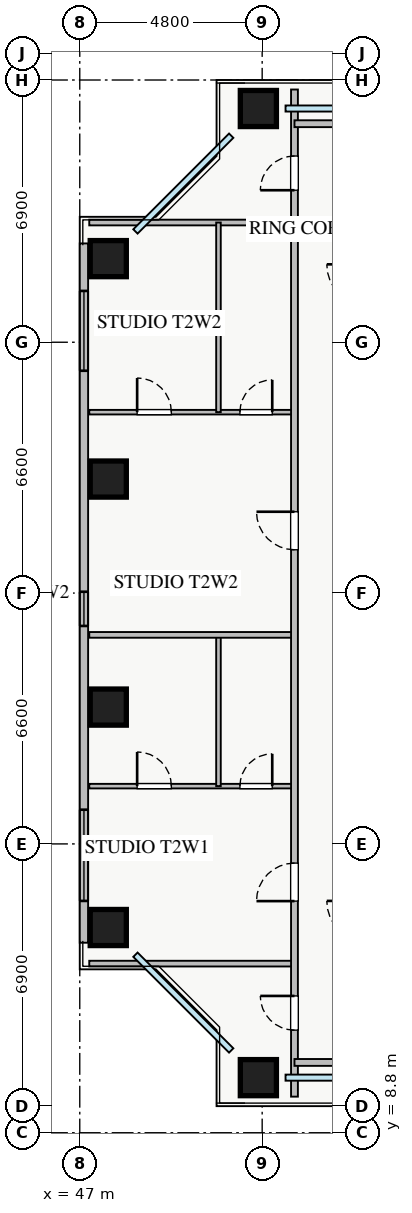
"""IFC4 building model, lengths in metres.
Left out: names, types, materials, properties, quantities, classifications, styles, units other than length and angle.
Written with IfcOpenShell. Run it as: python <this file> out.ifc"""

import sys

from ifc_helpers import new_model, si_unit, direction, frame, frame_2d, origin, origin_2d, place, context, subcontext, project, spatial, rectangle, extrude, source, transform, mapped, element, fill, save


model = new_model("IFC4")
c1 = context("Model", 3, precision=1e-05, world=origin(), true_north=direction((0.0, 1.0)))
c2 = subcontext(c1, "Body", "Model", "MODEL_VIEW")
j1 = project(units=[si_unit("LENGTHUNIT", "METRE"), si_unit("PLANEANGLEUNIT", "RADIAN")], contexts=[c1])
p1 = place(None, origin())
s1 = spatial("IfcSite", under=j1, at=p1, CompositionType="ELEMENT")
p2 = place(p1, origin())
s2 = spatial("IfcBuilding", under=s1, at=p2, CompositionType="ELEMENT")
p3 = place(p2, frame((0.0, 0.0, 53.5)))
s3 = spatial("IfcBuildingStorey", under=s2, at=p3, CompositionType="ELEMENT", Elevation=53.5)
m1 = source(origin(), c2, "Body", "SweptSolid", [
    extrude(rectangle(XDim=0.95, YDim=0.95, at=origin_2d()), origin(), (0.0, 0.0, 1.0), 3.25),
])
for number, where, z_axis, x_axis in (
    (1, (51.7, 10.25, 0.0), (0.0, 0.0, 1.0), (1.0, 0.0, 0.0)),
    (2, (51.7, 35.75, 0.0), (0.0, 0.0, 1.0), (1.0, 0.0, 0.0)),
    (3, (47.75, 14.2, 0.0), (0.0, 0.0, 1.0), (1.0, 0.0, 0.0)),
    (4, (47.75, 20.0, 0.0), (0.0, 0.0, 1.0), (1.0, 0.0, 0.0)),
    (5, (47.75, 26.0, 0.0), (0.0, 0.0, 1.0), (1.0, 0.0, 0.0)),
    (6, (47.75, 31.8, 0.0), (0.0, 0.0, 1.0), (1.0, 0.0, 0.0)),
):
    element("IfcColumn", number, at=place(p3, frame(where, z_axis=z_axis, x_axis=x_axis)), inside=s3, PredefinedType="COLUMN", context=c2, shape_type="MappedRepresentation", body=[
        mapped(m1, transform((0.0, 0.0, 0.0), x_axis=(1.0, 0.0, 0.0), y_axis=(0.0, 1.0, 0.0), z_axis=(0.0, 0.0, 1.0), scale=1.0)),
    ])
p4 = place(p3, frame((47.11, 13.8, 0.0), z_axis=(0.0, 0.0, 1.0), x_axis=(0.0, 1.0, 0.0)))
e7 = element("IfcWall", 7, at=p4, inside=s3, PredefinedType="STANDARD", context=c2, shape_type="SweptSolid", body=[
    extrude(rectangle(XDim=18.4, YDim=0.22, at=frame_2d((9.2, 0.0))), origin(), (0.0, 0.0, 1.0), 2.61),
])
p5 = place(p4, frame((1.1, 0.0, 0.9)))
e8 = element("IfcOpeningElement", 8, at=p5, cuts=e7, PredefinedType="OPENING", context=c2, shape_type="SweptSolid", body=[
    extrude(rectangle(XDim=2.4, YDim=1.48, at=frame_2d((1.2, 0.74))), frame((0.0, 0.12, 0.0), z_axis=(0.0, -1.0, 0.0), x_axis=(1.0, 0.0, 0.0)), (0.0, 0.0, 1.0), 0.24),
])
p6 = place(p4, frame((15.05, 0.0, 0.9)))
e9 = element("IfcOpeningElement", 9, at=p6, cuts=e7, PredefinedType="OPENING", context=c2, shape_type="SweptSolid", body=[
    extrude(rectangle(XDim=2.1, YDim=1.48, at=frame_2d((1.05, 0.74))), frame((0.0, 0.12, 0.0), z_axis=(0.0, -1.0, 0.0), x_axis=(1.0, 0.0, 0.0)), (0.0, 0.0, 1.0), 0.24),
])
p7 = place(p4, frame((8.335, 0.0, 0.9)))
e10 = element("IfcOpeningElement", 10, at=p7, cuts=e7, PredefinedType="OPENING", context=c2, shape_type="SweptSolid", body=[
    extrude(rectangle(XDim=0.9, YDim=1.2, at=frame_2d((0.45, 0.6))), frame((0.0, 0.12, 0.0), z_axis=(0.0, -1.0, 0.0), x_axis=(1.0, 0.0, 0.0)), (0.0, 0.0, 1.0), 0.24),
])
for number, where, z_axis, x_axis in (
    (11, (47.25, 32.75, 0.0), (0.0, 0.0, 1.0), (1.0, 0.0, 0.0)),
    (12, (47.25, 13.25, 0.0), (0.0, 0.0, 1.0), (1.0, 0.0, 0.0)),
):
    element("IfcWall", number, at=place(p3, frame(where, z_axis=z_axis, x_axis=x_axis)), inside=s3, PredefinedType="PARTITIONING", context=c2, shape_type="SweptSolid", body=[
        extrude(rectangle(XDim=5.4, YDim=0.15, at=frame_2d((2.7, 0.0))), origin(), (0.0, 0.0, 1.0), 3.07),
    ])
p8 = place(p3, frame((47.25, 17.92, 0.0), z_axis=(0.0, 0.0, 1.0), x_axis=(1.0, 0.0, 0.0)))
e13 = element("IfcWall", 13, at=p8, inside=s3, PredefinedType="PLUMBINGWALL", context=c2, shape_type="SweptSolid", body=[
    extrude(rectangle(XDim=5.4, YDim=0.12, at=frame_2d((2.7, 0.0))), origin(), (0.0, 0.0, 1.0), 3.07),
])
p9 = place(p8, frame((1.26, 0.0, 0.0)))
e14 = element("IfcOpeningElement", 14, at=p9, cuts=e13, PredefinedType="OPENING", context=c2, shape_type="SweptSolid", body=[
    extrude(rectangle(XDim=0.9, YDim=2.05, at=frame_2d((0.45, 1.025))), frame((0.0, 0.07, 0.0), z_axis=(0.0, -1.0, 0.0), x_axis=(1.0, 0.0, 0.0)), (0.0, 0.0, 1.0), 0.14),
])
p10 = place(p8, frame((3.965, 0.0, 0.0)))
e15 = element("IfcOpeningElement", 15, at=p10, cuts=e13, PredefinedType="OPENING", context=c2, shape_type="SweptSolid", body=[
    extrude(rectangle(XDim=0.85, YDim=2.05, at=frame_2d((0.425, 1.025))), frame((0.0, 0.07, 0.0), z_axis=(0.0, -1.0, 0.0), x_axis=(1.0, 0.0, 0.0)), (0.0, 0.0, 1.0), 0.14),
])
p11 = place(p3, frame((50.65, 17.92, 0.0), z_axis=(0.0, 0.0, 1.0), x_axis=(0.0, 1.0, 0.0)))
e16 = element("IfcWall", 16, at=p11, inside=s3, PredefinedType="PLUMBINGWALL", context=c2, shape_type="SweptSolid", body=[
    extrude(rectangle(XDim=3.98, YDim=0.12, at=frame_2d((1.99, 0.0))), origin(), (0.0, 0.0, 1.0), 3.07),
])
p12 = place(p3, frame((47.25, 27.76, 0.0), z_axis=(0.0, 0.0, 1.0), x_axis=(1.0, 0.0, 0.0)))
e17 = element("IfcWall", 17, at=p12, inside=s3, PredefinedType="PLUMBINGWALL", context=c2, shape_type="SweptSolid", body=[
    extrude(rectangle(XDim=5.4, YDim=0.12, at=frame_2d((2.7, 0.0))), origin(), (0.0, 0.0, 1.0), 3.07),
])
p13 = place(p12, frame((1.26, 0.0, 0.0)))
e18 = element("IfcOpeningElement", 18, at=p13, cuts=e17, PredefinedType="OPENING", context=c2, shape_type="SweptSolid", body=[
    extrude(rectangle(XDim=0.9, YDim=2.05, at=frame_2d((0.45, 1.025))), frame((0.0, 0.07, 0.0), z_axis=(0.0, -1.0, 0.0), x_axis=(1.0, 0.0, 0.0)), (0.0, 0.0, 1.0), 0.14),
])
p14 = place(p12, frame((3.965, 0.0, 0.0)))
e19 = element("IfcOpeningElement", 19, at=p14, cuts=e17, PredefinedType="OPENING", context=c2, shape_type="SweptSolid", body=[
    extrude(rectangle(XDim=0.85, YDim=2.05, at=frame_2d((0.425, 1.025))), frame((0.0, 0.07, 0.0), z_axis=(0.0, -1.0, 0.0), x_axis=(1.0, 0.0, 0.0)), (0.0, 0.0, 1.0), 0.14),
])
p15 = place(p3, frame((50.65, 27.76, 0.0), z_axis=(0.0, 0.0, 1.0), x_axis=(0.0, 1.0, 0.0)))
e20 = element("IfcWall", 20, at=p15, inside=s3, PredefinedType="PLUMBINGWALL", context=c2, shape_type="SweptSolid", body=[
    extrude(rectangle(XDim=4.99, YDim=0.12, at=frame_2d((2.495, 0.0))), origin(), (0.0, 0.0, 1.0), 3.07),
])
p16 = place(p3, frame((47.25, 21.9, 0.0), z_axis=(0.0, 0.0, 1.0), x_axis=(1.0, 0.0, 0.0)))
e21 = element("IfcWall", 21, at=p16, inside=s3, PredefinedType="PARTITIONING", context=c2, shape_type="SweptSolid", body=[
    extrude(rectangle(XDim=5.4, YDim=0.15, at=frame_2d((2.7, 0.0))), origin(), (0.0, 0.0, 1.0), 3.07),
])
p17 = place(p3, frame((52.65, 9.75, 0.0), z_axis=(0.0, 0.0, 1.0), x_axis=(0.0, 1.0, 0.0)))
e22 = element("IfcWall", 22, at=p17, inside=s3, PredefinedType="PARTITIONING", context=c2, shape_type="SweptSolid", body=[
    extrude(rectangle(XDim=26.5, YDim=0.18, at=frame_2d((13.25, 0.0))), origin(), (0.0, 0.0, 1.0), 3.07),
])
p18 = place(p17, frame((23.85, 0.0, 0.0)))
e23 = element("IfcOpeningElement", 23, at=p18, cuts=e22, PredefinedType="OPENING", context=c2, shape_type="SweptSolid", body=[
    extrude(rectangle(XDim=0.9, YDim=2.05, at=frame_2d((0.45, 1.025))), frame((0.0, 0.1, 0.0), z_axis=(0.0, -1.0, 0.0), x_axis=(1.0, 0.0, 0.0)), (0.0, 0.0, 1.0), 0.2),
])
p19 = place(p17, frame((1.75, 0.0, 0.0)))
e24 = element("IfcOpeningElement", 24, at=p19, cuts=e22, PredefinedType="OPENING", context=c2, shape_type="SweptSolid", body=[
    extrude(rectangle(XDim=0.9, YDim=2.05, at=frame_2d((0.45, 1.025))), frame((0.0, 0.1, 0.0), z_axis=(0.0, -1.0, 0.0), x_axis=(1.0, 0.0, 0.0)), (0.0, 0.0, 1.0), 0.2),
])
p20 = place(p17, frame((5.145, 0.0, 0.0)))
e25 = element("IfcOpeningElement", 25, at=p20, cuts=e22, PredefinedType="OPENING", context=c2, shape_type="SweptSolid", body=[
    extrude(rectangle(XDim=1.0, YDim=2.05, at=frame_2d((0.5, 1.025))), frame((0.0, 0.1, 0.0), z_axis=(0.0, -1.0, 0.0), x_axis=(1.0, 0.0, 0.0)), (0.0, 0.0, 1.0), 0.2),
])
p21 = place(p17, frame((14.39, 0.0, 0.0)))
e26 = element("IfcOpeningElement", 26, at=p21, cuts=e22, PredefinedType="OPENING", context=c2, shape_type="SweptSolid", body=[
    extrude(rectangle(XDim=1.0, YDim=2.05, at=frame_2d((0.5, 1.025))), frame((0.0, 0.1, 0.0), z_axis=(0.0, -1.0, 0.0), x_axis=(1.0, 0.0, 0.0)), (0.0, 0.0, 1.0), 0.2),
])
p22 = place(p3, frame((52.65, 35.35, 0.0), z_axis=(0.0, 0.0, 1.0), x_axis=(1.0, 0.0, 0.0)))
e27 = element("IfcWall", 27, at=p22, inside=s3, PredefinedType="PARTITIONING", context=c2, shape_type="SweptSolid", body=[
    extrude(rectangle(XDim=17.0, YDim=0.18, at=frame_2d((8.5, 0.0))), origin(), (0.0, 0.0, 1.0), 3.07),
])
p23 = place(p22, frame((3.825, 0.0, 0.0)))
e28 = element("IfcOpeningElement", 28, at=p23, cuts=e27, PredefinedType="OPENING", context=c2, shape_type="SweptSolid", body=[
    extrude(rectangle(XDim=0.9, YDim=2.05, at=frame_2d((0.45, 1.025))), frame((0.0, 0.1, 0.0), z_axis=(0.0, -1.0, 0.0), x_axis=(1.0, 0.0, 0.0)), (0.0, 0.0, 1.0), 0.2),
])
p24 = place(p22, frame((12.325, 0.0, 0.0)))
e29 = element("IfcOpeningElement", 29, at=p24, cuts=e27, PredefinedType="OPENING", context=c2, shape_type="SweptSolid", body=[
    extrude(rectangle(XDim=0.9, YDim=2.05, at=frame_2d((0.45, 1.025))), frame((0.0, 0.1, 0.0), z_axis=(0.0, -1.0, 0.0), x_axis=(1.0, 0.0, 0.0)), (0.0, 0.0, 1.0), 0.2),
])
p25 = place(p3, frame((52.65, 10.65, 0.0), z_axis=(0.0, 0.0, 1.0), x_axis=(1.0, 0.0, 0.0)))
e30 = element("IfcWall", 30, at=p25, inside=s3, PredefinedType="PARTITIONING", context=c2, shape_type="SweptSolid", body=[
    extrude(rectangle(XDim=17.0, YDim=0.18, at=frame_2d((8.5, 0.0))), origin(), (0.0, 0.0, 1.0), 3.07),
])
p26 = place(p25, frame((4.375, 0.0, 0.0)))
e31 = element("IfcOpeningElement", 31, at=p26, cuts=e30, PredefinedType="OPENING", context=c2, shape_type="SweptSolid", body=[
    extrude(rectangle(XDim=0.9, YDim=2.05, at=frame_2d((0.45, 1.025))), frame((0.0, 0.1, 0.0), z_axis=(0.0, -1.0, 0.0), x_axis=(1.0, 0.0, 0.0)), (0.0, 0.0, 1.0), 0.2),
])
p27 = place(p25, frame((12.875, 0.0, 0.0)))
e32 = element("IfcOpeningElement", 32, at=p27, cuts=e30, PredefinedType="OPENING", context=c2, shape_type="SweptSolid", body=[
    extrude(rectangle(XDim=0.9, YDim=2.05, at=frame_2d((0.45, 1.025))), frame((0.0, 0.1, 0.0), z_axis=(0.0, -1.0, 0.0), x_axis=(1.0, 0.0, 0.0)), (0.0, 0.0, 1.0), 0.2),
])
m2 = source(origin(), c2, "Body", "SweptSolid", [
    extrude(rectangle(XDim=2.4, YDim=1.48, at=frame_2d((1.2, 0.74))), frame((0.0, 0.03, 0.0), z_axis=(0.0, -1.0, 0.0), x_axis=(1.0, 0.0, 0.0)), (0.0, 0.0, 1.0), 0.06),
])
p28 = place(p5, origin())
e33 = element("IfcWindow", 33, at=p28, inside=s3, PartitioningType="TRIPLE_PANEL_VERTICAL", PredefinedType="WINDOW", context=c2, shape_type="MappedRepresentation", body=[
    mapped(m2, transform((0.0, 0.0, 0.0), x_axis=(1.0, 0.0, 0.0), y_axis=(0.0, 1.0, 0.0), z_axis=(0.0, 0.0, 1.0), scale=1.0)),
])
fill(e8, e33)
m3 = source(origin(), c2, "Body", "SweptSolid", [
    extrude(rectangle(XDim=2.1, YDim=1.48, at=frame_2d((1.05, 0.74))), frame((0.0, 0.03, 0.0), z_axis=(0.0, -1.0, 0.0), x_axis=(1.0, 0.0, 0.0)), (0.0, 0.0, 1.0), 0.06),
])
p29 = place(p6, origin())
e34 = element("IfcWindow", 34, at=p29, inside=s3, PartitioningType="TRIPLE_PANEL_VERTICAL", PredefinedType="WINDOW", context=c2, shape_type="MappedRepresentation", body=[
    mapped(m3, transform((0.0, 0.0, 0.0), x_axis=(1.0, 0.0, 0.0), y_axis=(0.0, 1.0, 0.0), z_axis=(0.0, 0.0, 1.0), scale=1.0)),
])
fill(e9, e34)
m4 = source(origin(), c2, "Body", "SweptSolid", [
    extrude(rectangle(XDim=0.9, YDim=2.05, at=frame_2d((0.45, 1.025))), frame((0.0, 0.025, 0.0), z_axis=(0.0, -1.0, 0.0), x_axis=(1.0, 0.0, 0.0)), (0.0, 0.0, 1.0), 0.05),
])
p30 = place(p9, origin())
e35 = element("IfcDoor", 35, at=p30, inside=s3, OperationType="SINGLE_SWING_LEFT", PredefinedType="DOOR", context=c2, shape_type="MappedRepresentation", body=[
    mapped(m4, transform((0.0, 0.0, 0.0), x_axis=(1.0, 0.0, 0.0), y_axis=(0.0, 1.0, 0.0), z_axis=(0.0, 0.0, 1.0), scale=1.0)),
])
fill(e14, e35)
m5 = source(origin(), c2, "Body", "SweptSolid", [
    extrude(rectangle(XDim=0.85, YDim=2.05, at=frame_2d((0.425, 1.025))), frame((0.0, 0.025, 0.0), z_axis=(0.0, -1.0, 0.0), x_axis=(1.0, 0.0, 0.0)), (0.0, 0.0, 1.0), 0.05),
])
p31 = place(p10, origin())
e36 = element("IfcDoor", 36, at=p31, inside=s3, OperationType="SINGLE_SWING_RIGHT", PredefinedType="DOOR", context=c2, shape_type="MappedRepresentation", body=[
    mapped(m5, transform((0.0, 0.0, 0.0), x_axis=(1.0, 0.0, 0.0), y_axis=(0.0, 1.0, 0.0), z_axis=(0.0, 0.0, 1.0), scale=1.0)),
])
fill(e15, e36)
p32 = place(p13, origin())
e37 = element("IfcDoor", 37, at=p32, inside=s3, OperationType="SINGLE_SWING_LEFT", PredefinedType="DOOR", context=c2, shape_type="MappedRepresentation", body=[
    mapped(m4, transform((0.0, 0.0, 0.0), x_axis=(1.0, 0.0, 0.0), y_axis=(0.0, 1.0, 0.0), z_axis=(0.0, 0.0, 1.0), scale=1.0)),
])
fill(e18, e37)
p33 = place(p14, origin())
e38 = element("IfcDoor", 38, at=p33, inside=s3, OperationType="SINGLE_SWING_RIGHT", PredefinedType="DOOR", context=c2, shape_type="MappedRepresentation", body=[
    mapped(m5, transform((0.0, 0.0, 0.0), x_axis=(1.0, 0.0, 0.0), y_axis=(0.0, 1.0, 0.0), z_axis=(0.0, 0.0, 1.0), scale=1.0)),
])
fill(e19, e38)
p34 = place(p18, origin())
e39 = element("IfcDoor", 39, at=p34, inside=s3, OperationType="SINGLE_SWING_LEFT", PredefinedType="DOOR", context=c2, shape_type="MappedRepresentation", body=[
    mapped(m4, transform((0.0, 0.0, 0.0), x_axis=(1.0, 0.0, 0.0), y_axis=(0.0, 1.0, 0.0), z_axis=(0.0, 0.0, 1.0), scale=1.0)),
])
fill(e23, e39)
p35 = place(p19, origin())
e40 = element("IfcDoor", 40, at=p35, inside=s3, OperationType="SINGLE_SWING_RIGHT", PredefinedType="DOOR", context=c2, shape_type="MappedRepresentation", body=[
    mapped(m4, transform((0.0, 0.0, 0.0), x_axis=(1.0, 0.0, 0.0), y_axis=(0.0, 1.0, 0.0), z_axis=(0.0, 0.0, 1.0), scale=1.0)),
])
fill(e24, e40)
m6 = source(origin(), c2, "Body", "SweptSolid", [
    extrude(rectangle(XDim=1.0, YDim=2.05, at=frame_2d((0.5, 1.025))), frame((0.0, 0.025, 0.0), z_axis=(0.0, -1.0, 0.0), x_axis=(1.0, 0.0, 0.0)), (0.0, 0.0, 1.0), 0.05),
])
p36 = place(p20, origin())
e41 = element("IfcDoor", 41, at=p36, inside=s3, OperationType="SINGLE_SWING_LEFT", PredefinedType="DOOR", context=c2, shape_type="MappedRepresentation", body=[
    mapped(m6, transform((0.0, 0.0, 0.0), x_axis=(1.0, 0.0, 0.0), y_axis=(0.0, 1.0, 0.0), z_axis=(0.0, 0.0, 1.0), scale=1.0)),
])
fill(e25, e41)
p37 = place(p21, origin())
e42 = element("IfcDoor", 42, at=p37, inside=s3, OperationType="SINGLE_SWING_RIGHT", PredefinedType="DOOR", context=c2, shape_type="MappedRepresentation", body=[
    mapped(m6, transform((0.0, 0.0, 0.0), x_axis=(1.0, 0.0, 0.0), y_axis=(0.0, 1.0, 0.0), z_axis=(0.0, 0.0, 1.0), scale=1.0)),
])
fill(e26, e42)
m7 = source(origin(), c2, "Body", "SweptSolid", [
    extrude(rectangle(XDim=0.9, YDim=1.2, at=frame_2d((0.45, 0.6))), frame((0.0, 0.03, 0.0), z_axis=(0.0, -1.0, 0.0), x_axis=(1.0, 0.0, 0.0)), (0.0, 0.0, 1.0), 0.06),
])
p38 = place(p7, origin())
e43 = element("IfcWindow", 43, at=p38, inside=s3, PartitioningType="SINGLE_PANEL", PredefinedType="WINDOW", context=c2, shape_type="MappedRepresentation", body=[
    mapped(m7, transform((0.0, 0.0, 0.0), x_axis=(1.0, 0.0, 0.0), y_axis=(0.0, 1.0, 0.0), z_axis=(0.0, 0.0, 1.0), scale=1.0)),
])
fill(e10, e43)
save(model, sys.argv[1])
